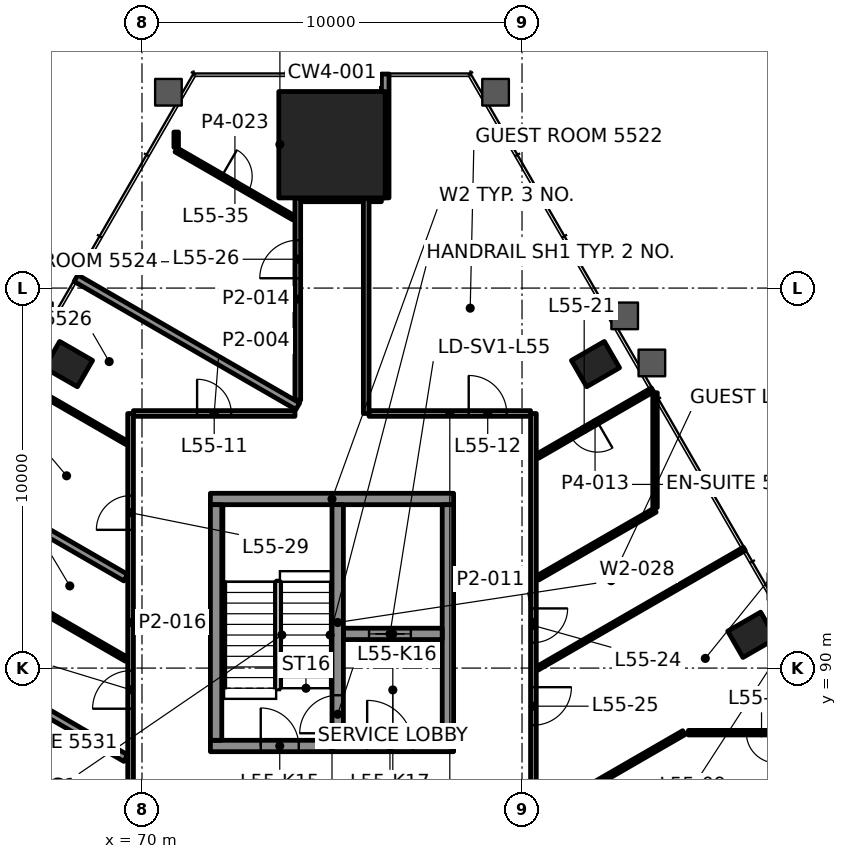
"""IFC4 building model, lengths in metres.
Left out: names, types, materials, properties, quantities, classifications, styles, units other than length and angle.
Written with IfcOpenShell. Run it as: python <this file> out.ifc"""

import sys

from ifc_helpers import new_model, si_unit, direction, frame, frame_2d, origin, origin_2d, place, context, subcontext, project, spatial, rectangle, hollow_rectangle, extrude, element, fill, save


model = new_model("IFC4")
c1 = context("Model", 3, precision=1e-05, world=origin(), true_north=direction((0.0, 1.0)))
c2 = subcontext(c1, "Body", "Model", "MODEL_VIEW")
j1 = project(units=[si_unit("LENGTHUNIT", "METRE"), si_unit("PLANEANGLEUNIT", "RADIAN")], contexts=[c1])
p1 = place(None, origin())
s1 = spatial("IfcSite", under=j1, at=p1, CompositionType="ELEMENT")
p2 = place(p1, origin())
s2 = spatial("IfcBuilding", under=s1, at=p2, CompositionType="ELEMENT")
p3 = place(p2, frame((0.0, 0.0, 233.8)))
s3 = spatial("IfcBuildingStorey", under=s2, at=p3, CompositionType="ELEMENT", Elevation=233.8)
p4 = place(p3, frame((75.0, 103.773, 0.0), z_axis=(0.0, 0.0, 1.0), x_axis=(-1.0, 0.0, 0.0)))
e1 = element("IfcColumn", 1, at=p4, inside=s3, PredefinedType="COLUMN", context=c2, shape_type="SweptSolid", body=[
    extrude(rectangle(XDim=2.8, YDim=2.8, at=origin_2d()), origin(), (0.0, 0.0, 1.0), 3.9),
])
for number, where, z_axis, x_axis in (
    (2, (86.046, 90.875, -0.0), (0.0, 0.0, 1.0), (-0.5, 0.866, 0.0)),
    (3, (81.933, 97.999, -0.0), (0.0, 0.0, 1.0), (-0.5, 0.866, 0.0)),
    (4, (68.067, 97.999, -0.0), (0.0, 0.0, 1.0), (-0.5, -0.866, 0.0)),
):
    element("IfcColumn", number, at=place(p3, frame(where, z_axis=z_axis, x_axis=x_axis)), inside=s3, PredefinedType="COLUMN", context=c2, shape_type="SweptSolid", body=[
        extrude(hollow_rectangle(XDim=0.8, YDim=1.0, WallThickness=0.05, at=origin_2d()), origin(), (0.0, 0.0, 1.0), 3.9),
    ])
p5 = place(p3, frame((71.8, 87.95, 0.0), z_axis=(0.0, 0.0, 1.0), x_axis=(1.0, 0.0, 0.0)))
e5 = element("IfcWall", 5, at=p5, inside=s3, PredefinedType="SHEAR", context=c2, shape_type="SweptSolid", body=[
    extrude(rectangle(XDim=6.4, YDim=0.3, at=frame_2d((3.2, 0.0))), origin(), (0.0, 0.0, 1.0), 3.7),
])
p6 = place(p5, frame((1.325, 0.0, 0.0)))
e6 = element("IfcOpeningElement", 6, at=p6, cuts=e5, PredefinedType="OPENING", context=c2, shape_type="SweptSolid", body=[
    extrude(rectangle(XDim=1.0, YDim=2.1, at=frame_2d((0.5, 1.05))), frame((0.0, 0.16, 0.0), z_axis=(0.0, -1.0, 0.0), x_axis=(1.0, 0.0, 0.0)), (0.0, 0.0, 1.0), 0.32),
])
p7 = place(p5, frame((4.125, 0.0, 0.0)))
e7 = element("IfcOpeningElement", 7, at=p7, cuts=e5, PredefinedType="OPENING", context=c2, shape_type="SweptSolid", body=[
    extrude(rectangle(XDim=1.2, YDim=2.1, at=frame_2d((0.6, 1.05))), frame((0.0, 0.16, 0.0), z_axis=(0.0, -1.0, 0.0), x_axis=(1.0, 0.0, 0.0)), (0.0, 0.0, 1.0), 0.32),
])
p8 = place(p3, frame((71.8, 94.45, 0.0), z_axis=(0.0, 0.0, 1.0), x_axis=(1.0, 0.0, 0.0)))
e8 = element("IfcWall", 8, at=p8, inside=s3, PredefinedType="SHEAR", context=c2, shape_type="SweptSolid", body=[
    extrude(rectangle(XDim=6.4, YDim=0.3, at=frame_2d((3.2, 0.0))), origin(), (0.0, 0.0, 1.0), 3.7),
])
for number, where, z_axis, x_axis in (
    (9, (71.95, 88.1, 0.0), (0.0, 0.0, 1.0), (0.0, 1.0, 0.0)),
    (10, (78.05, 88.1, 0.0), (0.0, 0.0, 1.0), (0.0, 1.0, 0.0)),
):
    element("IfcWall", number, at=place(p3, frame(where, z_axis=z_axis, x_axis=x_axis)), inside=s3, PredefinedType="SHEAR", context=c2, shape_type="SweptSolid", body=[
        extrude(rectangle(XDim=6.2, YDim=0.3, at=frame_2d((3.1, 0.0))), origin(), (0.0, 0.0, 1.0), 3.7),
    ])
p9 = place(p3, frame((75.3, 90.9, 0.0), z_axis=(0.0, 0.0, 1.0), x_axis=(1.0, 0.0, 0.0)))
e11 = element("IfcWall", 11, at=p9, inside=s3, PredefinedType="SHEAR", context=c2, shape_type="SweptSolid", body=[
    extrude(rectangle(XDim=2.6, YDim=0.3, at=frame_2d((1.3, 0.0))), origin(), (0.0, 0.0, 1.0), 3.7),
])
p10 = place(p9, frame((0.675, 0.0, 0.0)))
e12 = element("IfcOpeningElement", 12, at=p10, cuts=e11, PredefinedType="OPENING", context=c2, shape_type="SweptSolid", body=[
    extrude(rectangle(XDim=1.1, YDim=2.1, at=frame_2d((0.55, 1.05))), frame((0.0, 0.16, 0.0), z_axis=(0.0, -1.0, 0.0), x_axis=(1.0, 0.0, 0.0)), (0.0, 0.0, 1.0), 0.32),
])
p11 = place(p3, frame((75.15, 88.1, 0.0), z_axis=(0.0, 0.0, 1.0), x_axis=(0.0, 1.0, 0.0)))
e13 = element("IfcWall", 13, at=p11, inside=s3, PredefinedType="SHEAR", context=c2, shape_type="SweptSolid", body=[
    extrude(rectangle(XDim=6.2, YDim=0.3, at=frame_2d((3.1, 0.0))), origin(), (0.0, 0.0, 1.0), 3.7),
])
p12 = place(p11, frame((0.185, 0.0, 0.0)))
e14 = element("IfcOpeningElement", 14, at=p12, cuts=e13, PredefinedType="OPENING", context=c2, shape_type="SweptSolid", body=[
    extrude(rectangle(XDim=1.0, YDim=2.1, at=frame_2d((0.5, 1.05))), frame((0.0, 0.16, 0.0), z_axis=(0.0, -1.0, 0.0), x_axis=(1.0, 0.0, 0.0)), (0.0, 0.0, 1.0), 0.32),
])
p13 = place(p3, frame((88.642, 88.3, 0.0), z_axis=(0.0, 0.0, 1.0), x_axis=(-1.0, 0.0, 0.0)))
e15 = element("IfcWall", 15, at=p13, inside=s3, PredefinedType="PARTITIONING", context=c2, shape_type="SweptSolid", body=[
    extrude(rectangle(XDim=4.263, YDim=0.12, at=frame_2d((2.132, 0.0))), origin(), (0.0, 0.0, 1.0), 3.022),
])
p14 = place(p13, frame((1.939, 0.0, 0.0)))
e16 = element("IfcOpeningElement", 16, at=p14, cuts=e15, PredefinedType="OPENING", context=c2, shape_type="SweptSolid", body=[
    extrude(rectangle(XDim=0.8, YDim=2.1, at=frame_2d((0.4, 1.05))), frame((0.0, 0.07, 0.0), z_axis=(0.0, -1.0, 0.0), x_axis=(1.0, 0.0, 0.0)), (0.0, 0.0, 1.0), 0.14),
])
p15 = place(p3, frame((69.775, 96.7, 0.0), z_axis=(0.0, 0.0, 1.0), x_axis=(1.0, 0.0, 0.0)))
e17 = element("IfcWall", 17, at=p15, inside=s3, PredefinedType="PARTITIONING", context=c2, shape_type="SweptSolid", body=[
    extrude(rectangle(XDim=4.25, YDim=0.15, at=frame_2d((2.125, 0.0))), origin(), (0.0, 0.0, 1.0), 3.1),
])
p16 = place(p15, frame((1.675, 0.0, 0.0)))
e18 = element("IfcOpeningElement", 18, at=p16, cuts=e17, PredefinedType="OPENING", context=c2, shape_type="SweptSolid", body=[
    extrude(rectangle(XDim=0.9, YDim=2.1, at=frame_2d((0.45, 1.05))), frame((0.0, 0.085, 0.0), z_axis=(0.0, -1.0, 0.0), x_axis=(1.0, 0.0, 0.0)), (0.0, 0.0, 1.0), 0.17),
])
p17 = place(p3, frame((75.975, 96.7, 0.0), z_axis=(0.0, 0.0, 1.0), x_axis=(1.0, 0.0, 0.0)))
e19 = element("IfcWall", 19, at=p17, inside=s3, PredefinedType="PARTITIONING", context=c2, shape_type="SweptSolid", body=[
    extrude(rectangle(XDim=4.25, YDim=0.15, at=frame_2d((2.125, 0.0))), origin(), (0.0, 0.0, 1.0), 3.1),
])
p18 = place(p17, frame((2.622, 0.0, 0.0)))
e20 = element("IfcOpeningElement", 20, at=p18, cuts=e19, PredefinedType="OPENING", context=c2, shape_type="SweptSolid", body=[
    extrude(rectangle(XDim=1.0, YDim=2.1, at=frame_2d((0.5, 1.05))), frame((0.0, 0.085, 0.0), z_axis=(0.0, -1.0, 0.0), x_axis=(1.0, 0.0, 0.0)), (0.0, 0.0, 1.0), 0.17),
])
p19 = place(p3, frame((74.176, 102.373, 0.0), z_axis=(0.0, 0.0, 1.0), x_axis=(1.0, 0.0, 0.0)))
e21 = element("IfcWall", 21, at=p19, inside=s3, PredefinedType="PARTITIONING", context=c2, shape_type="SweptSolid", body=[
    extrude(rectangle(XDim=1.649, YDim=0.2, at=frame_2d((0.825, 0.0))), origin(), (0.0, 0.0, 1.0), 3.097),
])
p20 = place(p3, frame((84.493, 85.23, 0.0), z_axis=(0.0, 0.0, 1.0), x_axis=(0.866034146242, 0.499984857314, 0.0)))
e22 = element("IfcWall", 22, at=p20, inside=s3, PredefinedType="PARTITIONING", context=c2, shape_type="SweptSolid", body=[
    extrude(rectangle(XDim=5.128, YDim=0.12, at=frame_2d((2.564, 0.0))), origin(), (0.0, 0.0, 1.0), 3.022),
])
p21 = place(p3, frame((80.41, 86.078, 0.0), z_axis=(0.0, 0.0, 1.0), x_axis=(0.866033721197, 0.499985593543, 0.0)))
e23 = element("IfcWall", 23, at=p21, inside=s3, PredefinedType="PARTITIONING", context=c2, shape_type="SweptSolid", body=[
    extrude(rectangle(XDim=4.444, YDim=0.12, at=frame_2d((2.222, 0.0))), origin(), (0.0, 0.0, 1.0), 3.1),
])
p22 = place(p3, frame((80.401, 89.991, 0.0), z_axis=(0.0, 0.0, 1.0), x_axis=(0.86602790099, 0.499995674689, 0.0)))
e24 = element("IfcWall", 24, at=p22, inside=s3, PredefinedType="PARTITIONING", context=c2, shape_type="SweptSolid", body=[
    extrude(rectangle(XDim=6.291, YDim=0.1, at=frame_2d((3.146, 0.0))), origin(), (0.0, 0.0, 1.0), 3.022),
])
p23 = place(p3, frame((80.41, 92.37, 0.0), z_axis=(0.0, 0.0, 1.0), x_axis=(0.866028357664, 0.499994883695, 0.0)))
e25 = element("IfcWall", 25, at=p23, inside=s3, PredefinedType="PARTITIONING", context=c2, shape_type="SweptSolid", body=[
    extrude(rectangle(XDim=3.568, YDim=0.12, at=frame_2d((1.784, 0.0))), origin(), (0.0, 0.0, 1.0), 3.1),
])
p24 = place(p3, frame((83.433, 97.321, 0.0), z_axis=(0.0, 0.0, 1.0), x_axis=(-0.866022549299, -0.50000494408, 0.0)))
e26 = element("IfcWall", 26, at=p24, inside=s3, PredefinedType="PARTITIONING", context=c2, shape_type="SweptSolid", body=[
    extrude(rectangle(XDim=3.491, YDim=0.12, at=frame_2d((1.746, 0.0))), origin(), (0.0, 0.0, 1.0), 3.022),
])
p25 = place(p24, frame((1.676, 0.0, 0.0)))
e27 = element("IfcOpeningElement", 27, at=p25, cuts=e26, PredefinedType="OPENING", context=c2, shape_type="SweptSolid", body=[
    extrude(rectangle(XDim=0.8, YDim=2.1, at=frame_2d((0.4, 1.05))), frame((0.0, 0.07, 0.0), z_axis=(0.0, -1.0, 0.0), x_axis=(1.0, 0.0, 0.0)), (0.0, 0.0, 1.0), 0.14),
])
p26 = place(p3, frame((83.5, 94.224, 0.0), z_axis=(0.0, 0.0, 1.0), x_axis=(0.0, 1.0, 0.0)))
e28 = element("IfcWall", 28, at=p26, inside=s3, PredefinedType="PARTITIONING", context=c2, shape_type="SweptSolid", body=[
    extrude(rectangle(XDim=3.022, YDim=0.12, at=frame_2d((1.511, 0.0))), origin(), (0.0, 0.0, 1.0), 3.022),
])
p27 = place(p3, frame((80.3, 96.699, 0.0), z_axis=(0.0, 0.0, 1.0), x_axis=(0.0, -1.0, 0.0)))
e29 = element("IfcWall", 29, at=p27, inside=s3, PredefinedType="PARTITIONING", context=c2, shape_type="SweptSolid", body=[
    extrude(rectangle(XDim=10.999, YDim=0.15, at=frame_2d((5.5, 0.0))), origin(), (0.0, 0.0, 1.0), 3.1),
])
p28 = place(p27, frame((5.129, 0.0, 0.0)))
e30 = element("IfcOpeningElement", 30, at=p28, cuts=e29, PredefinedType="OPENING", context=c2, shape_type="SweptSolid", body=[
    extrude(rectangle(XDim=0.9, YDim=2.1, at=frame_2d((0.45, 1.05))), frame((0.0, 0.085, 0.0), z_axis=(0.0, -1.0, 0.0), x_axis=(1.0, 0.0, 0.0)), (0.0, 0.0, 1.0), 0.17),
])
p29 = place(p27, frame((7.202, 0.0, 0.0)))
e31 = element("IfcOpeningElement", 31, at=p29, cuts=e29, PredefinedType="OPENING", context=c2, shape_type="SweptSolid", body=[
    extrude(rectangle(XDim=1.0, YDim=2.1, at=frame_2d((0.5, 1.05))), frame((0.0, 0.085, 0.0), z_axis=(0.0, -1.0, 0.0), x_axis=(1.0, 0.0, 0.0)), (0.0, 0.0, 1.0), 0.17),
])
p30 = place(p3, frame((76.4, 102.373, 0.0), z_axis=(0.0, 0.0, 1.0), x_axis=(0.0, 1.0, 0.0)))
e32 = element("IfcWall", 32, at=p30, inside=s3, PredefinedType="PARTITIONING", context=c2, shape_type="SweptSolid", body=[
    extrude(rectangle(XDim=3.26, YDim=0.2, at=frame_2d((1.63, 0.0))), origin(), (0.0, 0.0, 1.0), 3.1),
])
p31 = place(p3, frame((75.9, 96.7, 0.0), z_axis=(0.0, 0.0, 1.0), x_axis=(0.0, 1.0, 0.0)))
e33 = element("IfcWall", 33, at=p31, inside=s3, PredefinedType="PARTITIONING", context=c2, shape_type="SweptSolid", body=[
    extrude(rectangle(XDim=5.673, YDim=0.15, at=frame_2d((2.836, 0.0))), origin(), (0.0, 0.0, 1.0), 3.1),
])
p32 = place(p3, frame((74.1, 97.05, 0.0), z_axis=(0.0, 0.0, 1.0), x_axis=(0.0, 1.0, 0.0)))
e34 = element("IfcWall", 34, at=p32, inside=s3, PredefinedType="PARTITIONING", context=c2, shape_type="SweptSolid", body=[
    extrude(rectangle(XDim=5.322, YDim=0.15, at=frame_2d((2.661, 0.0))), origin(), (0.0, 0.0, 1.0), 3.1),
])
p33 = place(p32, frame((3.209, 0.0, 0.0)))
e35 = element("IfcOpeningElement", 35, at=p33, cuts=e34, PredefinedType="OPENING", context=c2, shape_type="SweptSolid", body=[
    extrude(rectangle(XDim=1.0, YDim=2.1, at=frame_2d((0.5, 1.05))), frame((0.0, 0.085, 0.0), z_axis=(0.0, -1.0, 0.0), x_axis=(1.0, 0.0, 0.0)), (0.0, 0.0, 1.0), 0.17),
])
p34 = place(p3, frame((70.9, 103.703, 0.0), z_axis=(0.0, 0.0, 1.0), x_axis=(0.0, 1.0, 0.0)))
e36 = element("IfcWall", 36, at=p34, inside=s3, PredefinedType="PARTITIONING", context=c2, shape_type="SweptSolid", body=[
    extrude(rectangle(XDim=0.403, YDim=0.12, at=frame_2d((0.202, 0.0))), origin(), (0.0, 0.0, 1.0), 3.1),
])
p35 = place(p3, frame((69.7, 85.7, 0.0), z_axis=(0.0, 0.0, 1.0), x_axis=(0.0, 1.0, 0.0)))
e37 = element("IfcWall", 37, at=p35, inside=s3, PredefinedType="PARTITIONING", context=c2, shape_type="SweptSolid", body=[
    extrude(rectangle(XDim=10.999, YDim=0.15, at=frame_2d((5.5, 0.0))), origin(), (0.0, 0.0, 1.0), 3.1),
])
p36 = place(p35, frame((3.23, 0.0, 0.0)))
e38 = element("IfcOpeningElement", 38, at=p36, cuts=e37, PredefinedType="OPENING", context=c2, shape_type="SweptSolid", body=[
    extrude(rectangle(XDim=1.0, YDim=2.1, at=frame_2d((0.5, 1.05))), frame((0.0, 0.085, 0.0), z_axis=(0.0, -1.0, 0.0), x_axis=(1.0, 0.0, 0.0)), (0.0, 0.0, 1.0), 0.17),
])
p37 = place(p35, frame((7.938, 0.0, 0.0)))
e39 = element("IfcOpeningElement", 39, at=p37, cuts=e37, PredefinedType="OPENING", context=c2, shape_type="SweptSolid", body=[
    extrude(rectangle(XDim=0.9, YDim=2.1, at=frame_2d((0.45, 1.05))), frame((0.0, 0.085, 0.0), z_axis=(0.0, -1.0, 0.0), x_axis=(1.0, 0.0, 0.0)), (0.0, 0.0, 1.0), 0.17),
])
p38 = place(p3, frame((70.9, 103.634, 0.0), z_axis=(0.0, 0.0, 1.0), x_axis=(0.866028357664, -0.499994883695, 0.0)))
e40 = element("IfcWall", 40, at=p38, inside=s3, PredefinedType="PARTITIONING", context=c2, shape_type="SweptSolid", body=[
    extrude(rectangle(XDim=3.568, YDim=0.12, at=frame_2d((1.784, 0.0))), origin(), (0.0, 0.0, 1.0), 3.1),
])
p39 = place(p38, frame((1.384, 0.0, 0.0)))
e41 = element("IfcOpeningElement", 41, at=p39, cuts=e40, PredefinedType="OPENING", context=c2, shape_type="SweptSolid", body=[
    extrude(rectangle(XDim=0.8, YDim=2.1, at=frame_2d((0.4, 1.05))), frame((0.0, 0.07, 0.0), z_axis=(0.0, -1.0, 0.0), x_axis=(1.0, 0.0, 0.0)), (0.0, 0.0, 1.0), 0.14),
])
p40 = place(p3, frame((74.1, 96.89, 0.0), z_axis=(0.0, 0.0, 1.0), x_axis=(-0.866036585879, 0.499980631543, 0.0)))
e42 = element("IfcWall", 42, at=p40, inside=s3, PredefinedType="PARTITIONING", context=c2, shape_type="SweptSolid", body=[
    extrude(rectangle(XDim=6.74, YDim=0.2, at=frame_2d((3.37, 0.0))), origin(), (0.0, 0.0, 1.0), 3.1),
])
p41 = place(p3, frame((69.599, 95.927, 0.0), z_axis=(0.0, 0.0, 1.0), x_axis=(-0.866019199568, 0.500010745865, 0.0)))
e43 = element("IfcWall", 43, at=p41, inside=s3, PredefinedType="PARTITIONING", context=c2, shape_type="SweptSolid", body=[
    extrude(rectangle(XDim=3.323, YDim=0.1, at=frame_2d((1.662, 0.0))), origin(), (0.0, 0.0, 1.0), 3.022),
])
p42 = place(p3, frame((69.573, 92.38, 0.0), z_axis=(0.0, 0.0, 1.0), x_axis=(-0.866020331166, 0.500008785931, 0.0)))
e44 = element("IfcWall", 44, at=p42, inside=s3, PredefinedType="PARTITIONING", context=c2, shape_type="SweptSolid", body=[
    extrude(rectangle(XDim=4.01, YDim=0.2, at=frame_2d((2.005, 0.0))), origin(), (0.0, 0.0, 1.0), 3.022),
])
p43 = place(p3, frame((69.59, 90.233, 0.0), z_axis=(0.0, 0.0, 1.0), x_axis=(-0.866028357664, 0.499994883695, 0.0)))
e45 = element("IfcWall", 45, at=p43, inside=s3, PredefinedType="PARTITIONING", context=c2, shape_type="SweptSolid", body=[
    extrude(rectangle(XDim=3.568, YDim=0.12, at=frame_2d((1.784, 0.0))), origin(), (0.0, 0.0, 1.0), 3.1),
])
p44 = place(p3, frame((69.573, 87.631, 0.0), z_axis=(0.0, 0.0, 1.0), x_axis=(-0.866028616566, 0.499994435258, 0.0)))
e46 = element("IfcWall", 46, at=p44, inside=s3, PredefinedType="PARTITIONING", context=c2, shape_type="SweptSolid", body=[
    extrude(rectangle(XDim=3.548, YDim=0.2, at=frame_2d((1.774, 0.0))), origin(), (0.0, 0.0, 1.0), 3.1),
])
p45 = place(p3, frame((75.975, 102.373, 0.0), z_axis=(0.0, 0.0, 1.0), x_axis=(1.0, 0.0, 0.0)))
e47 = element("IfcWall", 47, at=p45, inside=s3, PredefinedType="PARTITIONING", context=c2, shape_type="SweptSolid", body=[
    extrude(rectangle(XDim=0.324, YDim=0.2, at=frame_2d((0.162, 0.0))), origin(), (0.0, 0.0, 1.0), 3.1),
])
p46 = place(p14, origin())
e48 = element("IfcDoor", 48, at=p46, inside=s3, OperationType="SINGLE_SWING_RIGHT", PredefinedType="DOOR", context=c2, shape_type="SweptSolid", body=[
    extrude(rectangle(XDim=0.8, YDim=2.1, at=frame_2d((0.4, 1.05))), frame((0.0, 0.025, 0.0), z_axis=(0.0, -1.0, 0.0), x_axis=(1.0, 0.0, 0.0)), (0.0, 0.0, 1.0), 0.05),
])
fill(e16, e48)
p47 = place(p16, origin())
e49 = element("IfcDoor", 49, at=p47, inside=s3, OperationType="SINGLE_SWING_LEFT", PredefinedType="DOOR", context=c2, shape_type="SweptSolid", body=[
    extrude(rectangle(XDim=0.9, YDim=2.1, at=frame_2d((0.45, 1.05))), frame((0.0, 0.025, 0.0), z_axis=(0.0, -1.0, 0.0), x_axis=(1.0, 0.0, 0.0)), (0.0, 0.0, 1.0), 0.05),
])
fill(e18, e49)
p48 = place(p18, origin())
e50 = element("IfcDoor", 50, at=p48, inside=s3, OperationType="SINGLE_SWING_LEFT", PredefinedType="DOOR", context=c2, shape_type="SweptSolid", body=[
    extrude(rectangle(XDim=1.0, YDim=2.1, at=frame_2d((0.5, 1.05))), frame((0.0, 0.025, 0.0), z_axis=(0.0, -1.0, 0.0), x_axis=(1.0, 0.0, 0.0)), (0.0, 0.0, 1.0), 0.05),
])
fill(e20, e50)
p49 = place(p25, origin())
e51 = element("IfcDoor", 51, at=p49, inside=s3, OperationType="SINGLE_SWING_LEFT", PredefinedType="DOOR", context=c2, shape_type="SweptSolid", body=[
    extrude(rectangle(XDim=0.8, YDim=2.1, at=frame_2d((0.4, 1.05))), frame((0.0, 0.025, 0.0), z_axis=(0.0, -1.0, 0.0), x_axis=(1.0, 0.0, 0.0)), (0.0, 0.0, 1.0), 0.05),
])
fill(e27, e51)
p50 = place(p28, origin())
e52 = element("IfcDoor", 52, at=p50, inside=s3, OperationType="SINGLE_SWING_LEFT", PredefinedType="DOOR", context=c2, shape_type="SweptSolid", body=[
    extrude(rectangle(XDim=0.9, YDim=2.1, at=frame_2d((0.45, 1.05))), frame((0.0, 0.025, 0.0), z_axis=(0.0, -1.0, 0.0), x_axis=(1.0, 0.0, 0.0)), (0.0, 0.0, 1.0), 0.05),
])
fill(e30, e52)
p51 = place(p29, origin())
e53 = element("IfcDoor", 53, at=p51, inside=s3, OperationType="SINGLE_SWING_LEFT", PredefinedType="DOOR", context=c2, shape_type="SweptSolid", body=[
    extrude(rectangle(XDim=1.0, YDim=2.1, at=frame_2d((0.5, 1.05))), frame((0.0, 0.025, 0.0), z_axis=(0.0, -1.0, 0.0), x_axis=(1.0, 0.0, 0.0)), (0.0, 0.0, 1.0), 0.05),
])
fill(e31, e53)
p52 = place(p33, origin())
e54 = element("IfcDoor", 54, at=p52, inside=s3, OperationType="SINGLE_SWING_LEFT", PredefinedType="DOOR", context=c2, shape_type="SweptSolid", body=[
    extrude(rectangle(XDim=1.0, YDim=2.1, at=frame_2d((0.5, 1.05))), frame((0.0, 0.025, 0.0), z_axis=(0.0, -1.0, 0.0), x_axis=(1.0, 0.0, 0.0)), (0.0, 0.0, 1.0), 0.05),
])
fill(e35, e54)
p53 = place(p36, origin())
e55 = element("IfcDoor", 55, at=p53, inside=s3, OperationType="SINGLE_SWING_LEFT", PredefinedType="DOOR", context=c2, shape_type="SweptSolid", body=[
    extrude(rectangle(XDim=1.0, YDim=2.1, at=frame_2d((0.5, 1.05))), frame((0.0, 0.025, 0.0), z_axis=(0.0, -1.0, 0.0), x_axis=(1.0, 0.0, 0.0)), (0.0, 0.0, 1.0), 0.05),
])
fill(e38, e55)
p54 = place(p37, origin())
e56 = element("IfcDoor", 56, at=p54, inside=s3, OperationType="SINGLE_SWING_RIGHT", PredefinedType="DOOR", context=c2, shape_type="SweptSolid", body=[
    extrude(rectangle(XDim=0.9, YDim=2.1, at=frame_2d((0.45, 1.05))), frame((0.0, 0.025, 0.0), z_axis=(0.0, -1.0, 0.0), x_axis=(1.0, 0.0, 0.0)), (0.0, 0.0, 1.0), 0.05),
])
fill(e39, e56)
p55 = place(p39, origin())
e57 = element("IfcDoor", 57, at=p55, inside=s3, OperationType="SINGLE_SWING_LEFT", PredefinedType="DOOR", context=c2, shape_type="SweptSolid", body=[
    extrude(rectangle(XDim=0.8, YDim=2.1, at=frame_2d((0.4, 1.05))), frame((0.0, 0.025, 0.0), z_axis=(0.0, -1.0, 0.0), x_axis=(1.0, 0.0, 0.0)), (0.0, 0.0, 1.0), 0.05),
])
fill(e41, e57)
p56 = place(p3, origin())
p57 = place(p56, frame((85.49, 93.789, 0.15), z_axis=(0.0, 0.0, 1.0), x_axis=(-0.5, 0.866025, 0.0)))
p58 = place(p57, origin())
e58 = element("IfcWindow", 58, at=p58, inside=s3, PartitioningType="SINGLE_PANEL", PredefinedType="WINDOW", context=c2, shape_type="SweptSolid", body=[
    extrude(rectangle(XDim=2.667, YDim=3.55, at=frame_2d((1.333, 1.775))), frame((0.0, 0.03, 0.0), z_axis=(0.0, -1.0, 0.0), x_axis=(1.0, 0.0, 0.0)), (0.0, 0.0, 1.0), 0.06),
])
p59 = place(p56, frame((69.963, 103.234, 0.15), z_axis=(0.0, 0.0, 1.0), x_axis=(-0.5, -0.866025, 0.0)))
p60 = place(p59, origin())
e59 = element("IfcWindow", 59, at=p60, inside=s3, PartitioningType="SINGLE_PANEL", PredefinedType="WINDOW", context=c2, shape_type="SweptSolid", body=[
    extrude(rectangle(XDim=2.667, YDim=3.55, at=frame_2d((1.333, 1.775))), frame((0.0, 0.03, 0.0), z_axis=(0.0, -1.0, 0.0), x_axis=(1.0, 0.0, 0.0)), (0.0, 0.0, 1.0), 0.06),
])
p61 = place(p10, origin())
e60 = element("IfcDoor", 60, at=p61, inside=s3, OperationType="DOUBLE_DOOR_SLIDING", PredefinedType="DOOR", context=c2, shape_type="SweptSolid", body=[
    extrude(rectangle(XDim=1.1, YDim=2.1, at=frame_2d((0.55, 1.05))), frame((0.0, 0.025, 0.0), z_axis=(0.0, -1.0, 0.0), x_axis=(1.0, 0.0, 0.0)), (0.0, 0.0, 1.0), 0.05),
])
fill(e12, e60)
p62 = place(p6, origin())
e61 = element("IfcDoor", 61, at=p62, inside=s3, OperationType="SINGLE_SWING_RIGHT", PredefinedType="DOOR", context=c2, shape_type="SweptSolid", body=[
    extrude(rectangle(XDim=1.0, YDim=2.1, at=frame_2d((0.5, 1.05))), frame((0.0, 0.025, 0.0), z_axis=(0.0, -1.0, 0.0), x_axis=(1.0, 0.0, 0.0)), (0.0, 0.0, 1.0), 0.05),
])
fill(e6, e61)
p63 = place(p12, origin())
e62 = element("IfcDoor", 62, at=p63, inside=s3, OperationType="SINGLE_SWING_LEFT", PredefinedType="DOOR", context=c2, shape_type="SweptSolid", body=[
    extrude(rectangle(XDim=1.0, YDim=2.1, at=frame_2d((0.5, 1.05))), frame((0.0, 0.025, 0.0), z_axis=(0.0, -1.0, 0.0), x_axis=(1.0, 0.0, 0.0)), (0.0, 0.0, 1.0), 0.05),
])
fill(e14, e62)
p64 = place(p7, origin())
e63 = element("IfcDoor", 63, at=p64, inside=s3, OperationType="SINGLE_SWING_RIGHT", PredefinedType="DOOR", context=c2, shape_type="SweptSolid", body=[
    extrude(rectangle(XDim=1.2, YDim=2.1, at=frame_2d((0.6, 1.05))), frame((0.0, 0.025, 0.0), z_axis=(0.0, -1.0, 0.0), x_axis=(1.0, 0.0, 0.0)), (0.0, 0.0, 1.0), 0.05),
])
fill(e7, e63)
save(model, sys.argv[1])
